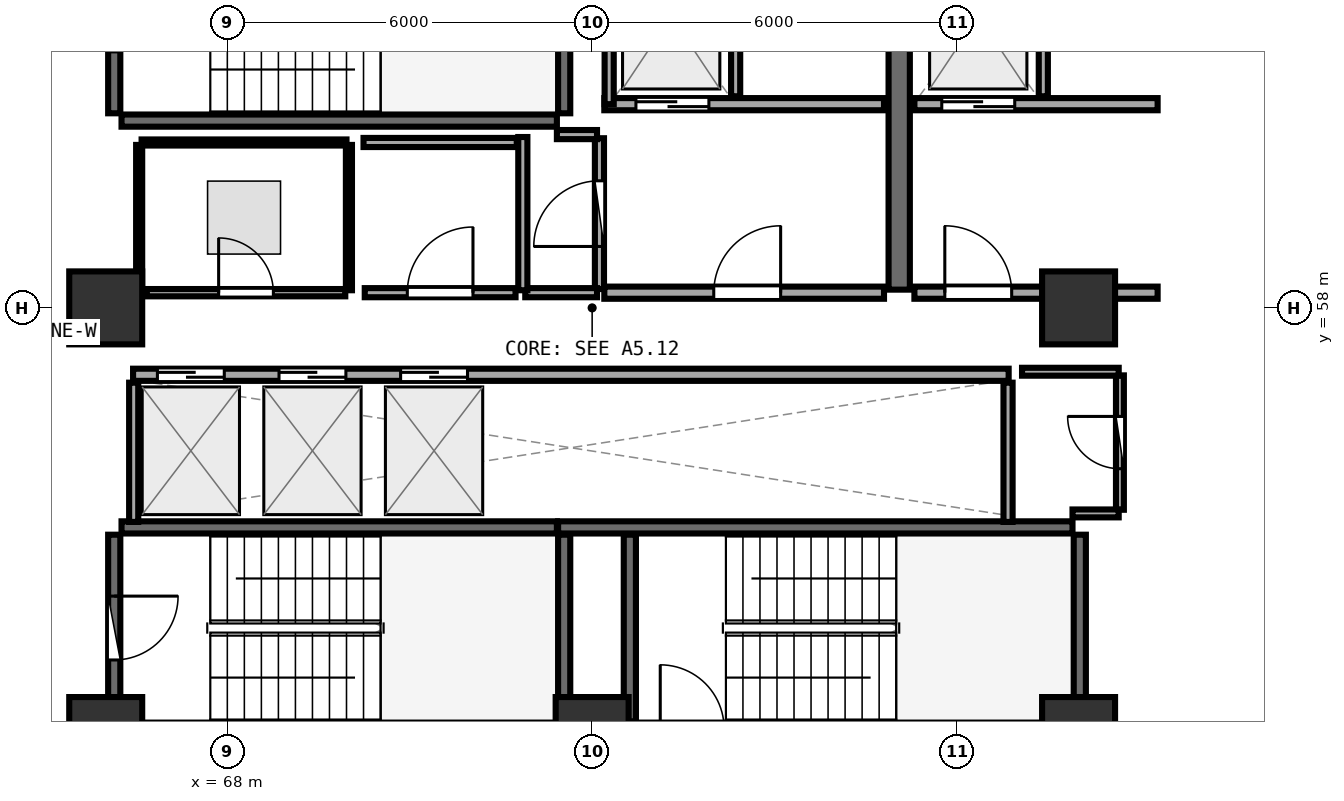
"""IFC4 building model, lengths in metres.
Left out: names, types, materials, properties, quantities, classifications, styles, units other than length and angle.
Written with IfcOpenShell. Run it as: python <this file> out.ifc"""

import sys

from ifc_helpers import new_model, si_unit, direction, frame, frame_2d, origin, origin_2d, place, context, subcontext, project, spatial, rectangle, extrude, element, fill, save


model = new_model("IFC4")
c1 = context("Model", 3, precision=1e-05, world=origin(), true_north=direction((0.0, 1.0)))
c2 = subcontext(c1, "Body", "Model", "MODEL_VIEW")
j1 = project(units=[si_unit("LENGTHUNIT", "METRE"), si_unit("PLANEANGLEUNIT", "RADIAN")], contexts=[c1])
p1 = place(None, origin())
s1 = spatial("IfcSite", under=j1, at=p1, CompositionType="ELEMENT")
p2 = place(p1, origin())
s2 = spatial("IfcBuilding", under=s1, at=p2, CompositionType="ELEMENT")
p3 = place(p2, frame((0.0, 0.0, 215.7)))
s3 = spatial("IfcBuildingStorey", under=s2, at=p3, CompositionType="ELEMENT", Elevation=215.7)
for number, where, z_axis, x_axis in (
    (1, (66.0, 51.0, 0.0), (0.0, 0.0, 1.0), (1.0, 0.0, 0.0)),
    (2, (74.0, 51.0, 0.0), (0.0, 0.0, 1.0), (1.0, 0.0, 0.0)),
    (3, (82.0, 51.0, 0.0), (0.0, 0.0, 1.0), (1.0, 0.0, 0.0)),
    (4, (82.0, 58.0, 0.0), (0.0, 0.0, 1.0), (1.0, 0.0, 0.0)),
    (5, (66.0, 58.0, 0.0), (0.0, 0.0, 1.0), (1.0, 0.0, 0.0)),
):
    element("IfcColumn", number, at=place(p3, frame(where, z_axis=z_axis, x_axis=x_axis)), inside=s3, PredefinedType="PILASTER", context=c2, shape_type="SweptSolid", body=[
        extrude(rectangle(XDim=1.2, YDim=1.2, at=origin_2d()), origin(), (0.0, 0.0, 1.0), 3.75),
    ])
p4 = place(p3, frame((66.26, 61.08, 0.0), z_axis=(0.0, 0.0, 1.0), x_axis=(1.0, 0.0, 0.0)))
e6 = element("IfcWall", 6, at=p4, inside=s3, PredefinedType="SHEAR", context=c2, shape_type="SweptSolid", body=[
    extrude(rectangle(XDim=7.16, YDim=0.2, at=frame_2d((3.58, 0.0))), origin(), (0.0, 0.0, 1.0), 3.49),
])
p5 = place(p3, frame((73.54, 61.2, 0.0), z_axis=(0.0, 0.0, 1.0), x_axis=(0.0, 1.0, 0.0)))
e7 = element("IfcWall", 7, at=p5, inside=s3, PredefinedType="SHEAR", context=c2, shape_type="SweptSolid", body=[
    extrude(rectangle(XDim=3.07, YDim=0.2, at=frame_2d((1.535, 0.0))), origin(), (0.0, 0.0, 1.0), 3.49),
])
p6 = place(p3, frame((66.14, 64.27, 0.0), z_axis=(0.0, 0.0, 1.0), x_axis=(0.0, -1.0, 0.0)))
e8 = element("IfcWall", 8, at=p6, inside=s3, PredefinedType="SHEAR", context=c2, shape_type="SweptSolid", body=[
    extrude(rectangle(XDim=3.07, YDim=0.2, at=frame_2d((1.535, 0.0))), origin(), (0.0, 0.0, 1.0), 3.49),
])
p7 = place(p6, frame((1.01, 0.0, 0.0)))
e9 = element("IfcOpeningElement", 9, at=p7, cuts=e8, PredefinedType="OPENING", context=c2, shape_type="SweptSolid", body=[
    extrude(rectangle(XDim=1.05, YDim=2.1, at=frame_2d((0.525, 1.05))), frame((0.0, 0.11, 0.0), z_axis=(0.0, -1.0, 0.0), x_axis=(1.0, 0.0, 0.0)), (0.0, 0.0, 1.0), 0.22),
])
p8 = place(p3, frame((82.02, 51.2, 0.0), z_axis=(0.0, 0.0, 1.0), x_axis=(0.0, 1.0, 0.0)))
e10 = element("IfcWall", 10, at=p8, inside=s3, PredefinedType="SHEAR", context=c2, shape_type="SweptSolid", body=[
    extrude(rectangle(XDim=3.07, YDim=0.2, at=frame_2d((1.535, 0.0))), origin(), (0.0, 0.0, 1.0), 3.49),
])
p9 = place(p3, frame((81.9, 54.39, 0.0), z_axis=(0.0, 0.0, 1.0), x_axis=(-1.0, 0.0, 0.0)))
e11 = element("IfcWall", 11, at=p9, inside=s3, PredefinedType="SHEAR", context=c2, shape_type="SweptSolid", body=[
    extrude(rectangle(XDim=8.46, YDim=0.2, at=frame_2d((4.23, 0.0))), origin(), (0.0, 0.0, 1.0), 3.49),
])
for number, where, z_axis, x_axis in (
    (12, (74.62, 54.27, 0.0), (0.0, 0.0, 1.0), (0.0, -1.0, 0.0)),
    (13, (73.54, 51.2, 0.0), (0.0, 0.0, 1.0), (0.0, 1.0, 0.0)),
):
    element("IfcWall", number, at=place(p3, frame(where, z_axis=z_axis, x_axis=x_axis)), inside=s3, PredefinedType="SHEAR", context=c2, shape_type="SweptSolid", body=[
        extrude(rectangle(XDim=3.07, YDim=0.2, at=frame_2d((1.535, 0.0))), origin(), (0.0, 0.0, 1.0), 3.49),
    ])
p10 = place(p3, frame((73.42, 54.39, 0.0), z_axis=(0.0, 0.0, 1.0), x_axis=(-1.0, 0.0, 0.0)))
e14 = element("IfcWall", 14, at=p10, inside=s3, PredefinedType="SHEAR", context=c2, shape_type="SweptSolid", body=[
    extrude(rectangle(XDim=7.16, YDim=0.2, at=frame_2d((3.58, 0.0))), origin(), (0.0, 0.0, 1.0), 3.49),
])
p11 = place(p3, frame((66.14, 54.27, 0.0), z_axis=(0.0, 0.0, 1.0), x_axis=(0.0, -1.0, 0.0)))
e15 = element("IfcWall", 15, at=p11, inside=s3, PredefinedType="SHEAR", context=c2, shape_type="SweptSolid", body=[
    extrude(rectangle(XDim=3.07, YDim=0.2, at=frame_2d((1.535, 0.0))), origin(), (0.0, 0.0, 1.0), 3.49),
])
p12 = place(p11, frame((1.01, 0.0, 0.0)))
e16 = element("IfcOpeningElement", 16, at=p12, cuts=e15, PredefinedType="OPENING", context=c2, shape_type="SweptSolid", body=[
    extrude(rectangle(XDim=1.05, YDim=2.1, at=frame_2d((0.525, 1.05))), frame((0.0, 0.11, 0.0), z_axis=(0.0, -1.0, 0.0), x_axis=(1.0, 0.0, 0.0)), (0.0, 0.0, 1.0), 0.22),
])
p13 = place(p3, frame((79.05, 58.3, 0.0), z_axis=(0.0, 0.0, 1.0), x_axis=(0.0, 1.0, 0.0)))
e17 = element("IfcWall", 17, at=p13, inside=s3, PredefinedType="SHEAR", context=c2, shape_type="SweptSolid", body=[
    extrude(rectangle(XDim=6.3, YDim=0.35, at=frame_2d((3.15, 0.0))), origin(), (0.0, 0.0, 1.0), 3.49),
])
p14 = place(p3, frame((74.2, 61.35, 0.0), z_axis=(0.0, 0.0, 1.0), x_axis=(1.0, 0.0, 0.0)))
e18 = element("IfcWall", 18, at=p14, inside=s3, PredefinedType="SOLIDWALL", context=c2, shape_type="SweptSolid", body=[
    extrude(rectangle(XDim=4.6, YDim=0.2, at=frame_2d((2.3, 0.0))), origin(), (0.0, 0.0, 1.0), 3.48),
])
p15 = place(p14, frame((0.52, 0.0, 0.0)))
e19 = element("IfcOpeningElement", 19, at=p15, cuts=e18, PredefinedType="OPENING", context=c2, shape_type="SweptSolid", body=[
    extrude(rectangle(XDim=1.2, YDim=2.15, at=frame_2d((0.6, 1.075))), frame((0.0, 0.11, 0.0), z_axis=(0.0, -1.0, 0.0), x_axis=(1.0, 0.0, 0.0)), (0.0, 0.0, 1.0), 0.22),
])
p16 = place(p3, frame((74.28, 61.35, 0.0), z_axis=(0.0, 0.0, 1.0), x_axis=(0.0, 1.0, 0.0)))
e20 = element("IfcWall", 20, at=p16, inside=s3, PredefinedType="PARTITIONING", context=c2, shape_type="SweptSolid", body=[
    extrude(rectangle(XDim=2.97, YDim=0.15, at=frame_2d((1.485, 0.0))), origin(), (0.0, 0.0, 1.0), 3.48),
])
p17 = place(p3, frame((76.36, 61.48, 0.0), z_axis=(0.0, 0.0, 1.0), x_axis=(0.0, 1.0, 0.0)))
e21 = element("IfcWall", 21, at=p17, inside=s3, PredefinedType="PARTITIONING", context=c2, shape_type="SweptSolid", body=[
    extrude(rectangle(XDim=2.84, YDim=0.15, at=frame_2d((1.42, 0.0))), origin(), (0.0, 0.0, 1.0), 3.48),
])
p18 = place(p3, frame((79.3, 61.35, 0.0), z_axis=(0.0, 0.0, 1.0), x_axis=(1.0, 0.0, 0.0)))
e22 = element("IfcWall", 22, at=p18, inside=s3, PredefinedType="SOLIDWALL", context=c2, shape_type="SweptSolid", body=[
    extrude(rectangle(XDim=4.0, YDim=0.2, at=frame_2d((2.0, 0.0))), origin(), (0.0, 0.0, 1.0), 2.775),
])
p19 = place(p18, frame((0.45, 0.0, 0.0)))
e23 = element("IfcOpeningElement", 23, at=p19, cuts=e22, PredefinedType="OPENING", context=c2, shape_type="SweptSolid", body=[
    extrude(rectangle(XDim=1.2, YDim=2.15, at=frame_2d((0.6, 1.075))), frame((0.0, 0.11, 0.0), z_axis=(0.0, -1.0, 0.0), x_axis=(1.0, 0.0, 0.0)), (0.0, 0.0, 1.0), 0.22),
])
p20 = place(p3, frame((81.42, 61.48, 0.0), z_axis=(0.0, 0.0, 1.0), x_axis=(0.0, 1.0, 0.0)))
e24 = element("IfcWall", 24, at=p20, inside=s3, PredefinedType="PARTITIONING", context=c2, shape_type="SweptSolid", body=[
    extrude(rectangle(XDim=2.84, YDim=0.15, at=frame_2d((1.42, 0.0))), origin(), (0.0, 0.0, 1.0), 3.48),
])
p21 = place(p3, frame((74.2, 58.25, 0.0), z_axis=(0.0, 0.0, 1.0), x_axis=(1.0, 0.0, 0.0)))
e25 = element("IfcWall", 25, at=p21, inside=s3, PredefinedType="SOLIDWALL", context=c2, shape_type="SweptSolid", body=[
    extrude(rectangle(XDim=4.6, YDim=0.2, at=frame_2d((2.3, 0.0))), origin(), (0.0, 0.0, 1.0), 3.48),
])
p22 = place(p21, frame((1.8, 0.0, 0.0)))
e26 = element("IfcOpeningElement", 26, at=p22, cuts=e25, PredefinedType="OPENING", context=c2, shape_type="SweptSolid", body=[
    extrude(rectangle(XDim=1.1, YDim=2.1, at=frame_2d((0.55, 1.05))), frame((0.0, 0.11, 0.0), z_axis=(0.0, -1.0, 0.0), x_axis=(1.0, 0.0, 0.0)), (0.0, 0.0, 1.0), 0.22),
])
p23 = place(p3, frame((79.3, 58.25, 0.0), z_axis=(0.0, 0.0, 1.0), x_axis=(1.0, 0.0, 0.0)))
e27 = element("IfcWall", 27, at=p23, inside=s3, PredefinedType="SOLIDWALL", context=c2, shape_type="SweptSolid", body=[
    extrude(rectangle(XDim=4.0, YDim=0.2, at=frame_2d((2.0, 0.0))), origin(), (0.0, 0.0, 1.0), 2.775),
])
p24 = place(p23, frame((0.5, 0.0, 0.0)))
e28 = element("IfcOpeningElement", 28, at=p24, cuts=e27, PredefinedType="OPENING", context=c2, shape_type="SweptSolid", body=[
    extrude(rectangle(XDim=1.1, YDim=2.1, at=frame_2d((0.55, 1.05))), frame((0.0, 0.11, 0.0), z_axis=(0.0, -1.0, 0.0), x_axis=(1.0, 0.0, 0.0)), (0.0, 0.0, 1.0), 0.22),
])
p25 = place(p3, frame((66.45, 56.9, 0.0), z_axis=(0.0, 0.0, 1.0), x_axis=(1.0, 0.0, 0.0)))
e29 = element("IfcWall", 29, at=p25, inside=s3, PredefinedType="SOLIDWALL", context=c2, shape_type="SweptSolid", body=[
    extrude(rectangle(XDim=14.4, YDim=0.2, at=frame_2d((7.2, 0.0))), origin(), (0.0, 0.0, 1.0), 3.48),
])
p26 = place(p25, frame((0.4, 0.0, 0.0)))
e30 = element("IfcOpeningElement", 30, at=p26, cuts=e29, PredefinedType="OPENING", context=c2, shape_type="SweptSolid", body=[
    extrude(rectangle(XDim=1.1, YDim=2.1, at=frame_2d((0.55, 1.05))), frame((0.0, 0.11, 0.0), z_axis=(0.0, -1.0, 0.0), x_axis=(1.0, 0.0, 0.0)), (0.0, 0.0, 1.0), 0.22),
])
p27 = place(p25, frame((2.4, 0.0, 0.0)))
e31 = element("IfcOpeningElement", 31, at=p27, cuts=e29, PredefinedType="OPENING", context=c2, shape_type="SweptSolid", body=[
    extrude(rectangle(XDim=1.1, YDim=2.1, at=frame_2d((0.55, 1.05))), frame((0.0, 0.11, 0.0), z_axis=(0.0, -1.0, 0.0), x_axis=(1.0, 0.0, 0.0)), (0.0, 0.0, 1.0), 0.22),
])
p28 = place(p25, frame((4.4, 0.0, 0.0)))
e32 = element("IfcOpeningElement", 32, at=p28, cuts=e29, PredefinedType="OPENING", context=c2, shape_type="SweptSolid", body=[
    extrude(rectangle(XDim=1.1, YDim=2.1, at=frame_2d((0.55, 1.05))), frame((0.0, 0.11, 0.0), z_axis=(0.0, -1.0, 0.0), x_axis=(1.0, 0.0, 0.0)), (0.0, 0.0, 1.0), 0.22),
])
for number, where, z_axis, x_axis in (
    (33, (66.46, 54.48, 0.0), (0.0, 0.0, 1.0), (0.0, 1.0, 0.0)),
    (34, (80.84, 54.48, 0.0), (0.0, 0.0, 1.0), (0.0, 1.0, 0.0)),
):
    element("IfcWall", number, at=place(p3, frame(where, z_axis=z_axis, x_axis=x_axis)), inside=s3, PredefinedType="PARTITIONING", context=c2, shape_type="SweptSolid", body=[
        extrude(rectangle(XDim=2.29, YDim=0.15, at=frame_2d((1.145, 0.0))), origin(), (0.0, 0.0, 1.0), 3.48),
    ])
p29 = place(p3, frame((74.12, 58.31, 0.0), z_axis=(0.0, 0.0, 1.0), x_axis=(0.0, 1.0, 0.0)))
e35 = element("IfcWall", 35, at=p29, inside=s3, PredefinedType="PARTITIONING", context=c2, shape_type="SweptSolid", body=[
    extrude(rectangle(XDim=2.48, YDim=0.15, at=frame_2d((1.24, 0.0))), origin(), (0.0, 0.0, 1.0), 3.48),
])
p30 = place(p29, frame((0.7, 0.0, 0.0)))
e36 = element("IfcOpeningElement", 36, at=p30, cuts=e35, PredefinedType="OPENING", context=c2, shape_type="SweptSolid", body=[
    extrude(rectangle(XDim=1.08, YDim=2.1, at=frame_2d((0.54, 1.05))), frame((0.0, 0.085, 0.0), z_axis=(0.0, -1.0, 0.0), x_axis=(1.0, 0.0, 0.0)), (0.0, 0.0, 1.0), 0.17),
])
p31 = place(p3, frame((82.68, 54.68, 0.0), z_axis=(0.0, 0.0, 1.0), x_axis=(0.0, 1.0, 0.0)))
e37 = element("IfcWall", 37, at=p31, inside=s3, PredefinedType="PLUMBINGWALL", context=c2, shape_type="SweptSolid", body=[
    extrude(rectangle(XDim=2.21, YDim=0.13, at=frame_2d((1.105, 0.0))), origin(), (0.0, 0.0, 1.0), 3.48),
])
p32 = place(p31, frame((0.675, 0.0, 0.0)))
e38 = element("IfcOpeningElement", 38, at=p32, cuts=e37, PredefinedType="OPENING", context=c2, shape_type="SweptSolid", body=[
    extrude(rectangle(XDim=0.86, YDim=2.05, at=frame_2d((0.43, 1.025))), frame((0.0, 0.075, 0.0), z_axis=(0.0, -1.0, 0.0), x_axis=(1.0, 0.0, 0.0)), (0.0, 0.0, 1.0), 0.15),
])
p33 = place(p3, frame((66.675, 58.25, 0.0), z_axis=(0.0, 0.0, 1.0), x_axis=(1.0, 0.0, 0.0)))
e39 = element("IfcWall", 39, at=p33, inside=s3, PredefinedType="PARTITIONING", context=c2, shape_type="SweptSolid", body=[
    extrude(rectangle(XDim=3.265, YDim=0.12, at=frame_2d((1.632, 0.0))), origin(), (0.0, 0.0, 1.0), 3.48),
])
p34 = place(p33, frame((1.182, 0.0, 0.0)))
e40 = element("IfcOpeningElement", 40, at=p34, cuts=e39, PredefinedType="OPENING", context=c2, shape_type="SweptSolid", body=[
    extrude(rectangle(XDim=0.9, YDim=2.08, at=frame_2d((0.45, 1.04))), frame((0.0, 0.07, 0.0), z_axis=(0.0, -1.0, 0.0), x_axis=(1.0, 0.0, 0.0)), (0.0, 0.0, 1.0), 0.14),
])
p35 = place(p3, frame((70.26, 58.25, 0.0), z_axis=(0.0, 0.0, 1.0), x_axis=(1.0, 0.0, 0.0)))
e41 = element("IfcWall", 41, at=p35, inside=s3, PredefinedType="PARTITIONING", context=c2, shape_type="SweptSolid", body=[
    extrude(rectangle(XDim=2.48, YDim=0.15, at=frame_2d((1.24, 0.0))), origin(), (0.0, 0.0, 1.0), 3.48),
])
p36 = place(p35, frame((0.7, 0.0, 0.0)))
e42 = element("IfcOpeningElement", 42, at=p36, cuts=e41, PredefinedType="OPENING", context=c2, shape_type="SweptSolid", body=[
    extrude(rectangle(XDim=1.08, YDim=2.1, at=frame_2d((0.54, 1.05))), frame((0.0, 0.085, 0.0), z_axis=(0.0, -1.0, 0.0), x_axis=(1.0, 0.0, 0.0)), (0.0, 0.0, 1.0), 0.17),
])
p37 = place(p3, frame((72.9, 58.25, 0.0), z_axis=(0.0, 0.0, 1.0), x_axis=(1.0, 0.0, 0.0)))
e43 = element("IfcWall", 43, at=p37, inside=s3, PredefinedType="PARTITIONING", context=c2, shape_type="SweptSolid", body=[
    extrude(rectangle(XDim=1.18, YDim=0.15, at=frame_2d((0.59, 0.0))), origin(), (0.0, 0.0, 1.0), 3.48),
])
p38 = place(p3, frame((74.08, 60.85, 0.0), z_axis=(0.0, 0.0, 1.0), x_axis=(-1.0, 0.0, 0.0)))
e44 = element("IfcWall", 44, at=p38, inside=s3, PredefinedType="PARTITIONING", context=c2, shape_type="SweptSolid", body=[
    extrude(rectangle(XDim=0.66, YDim=0.15, at=frame_2d((0.33, 0.0))), origin(), (0.0, 0.0, 1.0), 3.48),
])
p39 = place(p3, frame((72.86, 60.81, 0.0), z_axis=(0.0, 0.0, 1.0), x_axis=(0.0, -1.0, 0.0)))
e45 = element("IfcWall", 45, at=p39, inside=s3, PredefinedType="PARTITIONING", context=c2, shape_type="SweptSolid", body=[
    extrude(rectangle(XDim=2.52, YDim=0.15, at=frame_2d((1.26, 0.0))), origin(), (0.0, 0.0, 1.0), 3.48),
])
p40 = place(p3, frame((81.9, 54.62, 0.0), z_axis=(0.0, 0.0, 1.0), x_axis=(1.0, 0.0, 0.0)))
e46 = element("IfcWall", 46, at=p40, inside=s3, PredefinedType="PLUMBINGWALL", context=c2, shape_type="SweptSolid", body=[
    extrude(rectangle(XDim=0.76, YDim=0.13, at=frame_2d((0.38, 0.0))), origin(), (0.0, 0.0, 1.0), 2.775),
])
p41 = place(p3, frame((82.66, 56.95, 0.0), z_axis=(0.0, 0.0, 1.0), x_axis=(-1.0, 0.0, 0.0)))
e47 = element("IfcWall", 47, at=p41, inside=s3, PredefinedType="PLUMBINGWALL", context=c2, shape_type="SweptSolid", body=[
    extrude(rectangle(XDim=1.59, YDim=0.13, at=frame_2d((0.795, 0.0))), origin(), (0.0, 0.0, 1.0), 2.775),
])
p42 = place(p3, frame((70.0, 58.29, 0.0), z_axis=(0.0, 0.0, 1.0), x_axis=(0.0, 1.0, 0.0)))
e48 = element("IfcWall", 48, at=p42, inside=s3, PredefinedType="PARTITIONING", context=c2, shape_type="SweptSolid", body=[
    extrude(rectangle(XDim=2.39, YDim=0.1, at=frame_2d((1.195, 0.0))), origin(), (0.0, 0.0, 1.0), 3.48),
])
p43 = place(p3, frame((69.96, 60.72, 0.0), z_axis=(0.0, 0.0, 1.0), x_axis=(-1.0, 0.0, 0.0)))
e49 = element("IfcWall", 49, at=p43, inside=s3, PredefinedType="PARTITIONING", context=c2, shape_type="SweptSolid", body=[
    extrude(rectangle(XDim=3.37, YDim=0.1, at=frame_2d((1.685, 0.0))), origin(), (0.0, 0.0, 1.0), 3.48),
])
p44 = place(p3, frame((66.55, 60.68, 0.0), z_axis=(0.0, 0.0, 1.0), x_axis=(0.0, -1.0, 0.0)))
e50 = element("IfcWall", 50, at=p44, inside=s3, PredefinedType="PARTITIONING", context=c2, shape_type="SweptSolid", body=[
    extrude(rectangle(XDim=2.383, YDim=0.1, at=frame_2d((1.191, 0.0))), origin(), (0.0, 0.0, 1.0), 3.48),
])
p45 = place(p3, frame((72.76, 60.72, 0.0), z_axis=(0.0, 0.0, 1.0), x_axis=(-1.0, 0.0, 0.0)))
e51 = element("IfcWall", 51, at=p45, inside=s3, PredefinedType="PARTITIONING", context=c2, shape_type="SweptSolid", body=[
    extrude(rectangle(XDim=2.52, YDim=0.15, at=frame_2d((1.26, 0.0))), origin(), (0.0, 0.0, 1.0), 3.48),
])
p46 = place(p3, frame((82.588, 48.389, 0.0), z_axis=(0.0, 0.0, 1.0), x_axis=(0.68157475052, 0.731748494671, 0.0)))
e52 = element("IfcWall", 52, at=p46, inside=s3, PredefinedType="PARTITIONING", context=c2, shape_type="SweptSolid", body=[
    extrude(rectangle(XDim=5.08, YDim=0.1, at=frame_2d((2.54, 0.0))), origin(), (0.0, 0.0, 1.0), 3.025),
])
p47 = place(p3, frame((87.468, 60.334, 0.0), z_axis=(0.0, 0.0, 1.0), x_axis=(-0.534944175276, 0.844887406308, 0.0)))
e53 = element("IfcWall", 53, at=p47, inside=s3, PredefinedType="PARTITIONING", context=c2, shape_type="SweptSolid", body=[
    extrude(rectangle(XDim=8.128, YDim=0.1, at=frame_2d((4.064, 0.0))), origin(), (0.0, 0.0, 1.0), 3.025),
])
p48 = place(p12, origin())
e54 = element("IfcDoor", 54, at=p48, inside=s3, OperationType="SINGLE_SWING_LEFT", PredefinedType="DOOR", context=c2, shape_type="SweptSolid", body=[
    extrude(rectangle(XDim=1.05, YDim=2.1, at=frame_2d((0.525, 1.05))), frame((0.0, 0.025, 0.0), z_axis=(0.0, -1.0, 0.0), x_axis=(1.0, 0.0, 0.0)), (0.0, 0.0, 1.0), 0.05),
])
fill(e16, e54)
p49 = place(p15, origin())
e55 = element("IfcDoor", 55, at=p49, inside=s3, OperationType="DOUBLE_DOOR_SLIDING", PredefinedType="DOOR", context=c2, shape_type="SweptSolid", body=[
    extrude(rectangle(XDim=1.2, YDim=2.15, at=frame_2d((0.6, 1.075))), frame((0.0, 0.025, 0.0), z_axis=(0.0, -1.0, 0.0), x_axis=(1.0, 0.0, 0.0)), (0.0, 0.0, 1.0), 0.05),
])
fill(e19, e55)
p50 = place(p19, origin())
e56 = element("IfcDoor", 56, at=p50, inside=s3, OperationType="DOUBLE_DOOR_SLIDING", PredefinedType="DOOR", context=c2, shape_type="SweptSolid", body=[
    extrude(rectangle(XDim=1.2, YDim=2.15, at=frame_2d((0.6, 1.075))), frame((0.0, 0.025, 0.0), z_axis=(0.0, -1.0, 0.0), x_axis=(1.0, 0.0, 0.0)), (0.0, 0.0, 1.0), 0.05),
])
fill(e23, e56)
p51 = place(p22, frame((1.1, 0.0, 0.0), z_axis=(0.0, 0.0, 1.0), x_axis=(-1.0, 0.0, 0.0)))
e57 = element("IfcDoor", 57, at=p51, inside=s3, OperationType="SINGLE_SWING_LEFT", PredefinedType="DOOR", context=c2, shape_type="SweptSolid", body=[
    extrude(rectangle(XDim=1.1, YDim=2.1, at=frame_2d((0.55, 1.05))), frame((0.0, 0.025, 0.0), z_axis=(0.0, -1.0, 0.0), x_axis=(1.0, 0.0, 0.0)), (0.0, 0.0, 1.0), 0.05),
])
fill(e26, e57)
p52 = place(p24, frame((1.1, 0.0, 0.0), z_axis=(0.0, 0.0, 1.0), x_axis=(-1.0, 0.0, 0.0)))
e58 = element("IfcDoor", 58, at=p52, inside=s3, OperationType="SINGLE_SWING_RIGHT", PredefinedType="DOOR", context=c2, shape_type="SweptSolid", body=[
    extrude(rectangle(XDim=1.1, YDim=2.1, at=frame_2d((0.55, 1.05))), frame((0.0, 0.025, 0.0), z_axis=(0.0, -1.0, 0.0), x_axis=(1.0, 0.0, 0.0)), (0.0, 0.0, 1.0), 0.05),
])
fill(e28, e58)
p53 = place(p26, origin())
e59 = element("IfcDoor", 59, at=p53, inside=s3, OperationType="DOUBLE_DOOR_SLIDING", PredefinedType="DOOR", context=c2, shape_type="SweptSolid", body=[
    extrude(rectangle(XDim=1.1, YDim=2.1, at=frame_2d((0.55, 1.05))), frame((0.0, 0.025, 0.0), z_axis=(0.0, -1.0, 0.0), x_axis=(1.0, 0.0, 0.0)), (0.0, 0.0, 1.0), 0.05),
])
fill(e30, e59)
p54 = place(p27, origin())
e60 = element("IfcDoor", 60, at=p54, inside=s3, OperationType="DOUBLE_DOOR_SLIDING", PredefinedType="DOOR", context=c2, shape_type="SweptSolid", body=[
    extrude(rectangle(XDim=1.1, YDim=2.1, at=frame_2d((0.55, 1.05))), frame((0.0, 0.025, 0.0), z_axis=(0.0, -1.0, 0.0), x_axis=(1.0, 0.0, 0.0)), (0.0, 0.0, 1.0), 0.05),
])
fill(e31, e60)
p55 = place(p28, origin())
e61 = element("IfcDoor", 61, at=p55, inside=s3, OperationType="DOUBLE_DOOR_SLIDING", PredefinedType="DOOR", context=c2, shape_type="SweptSolid", body=[
    extrude(rectangle(XDim=1.1, YDim=2.1, at=frame_2d((0.55, 1.05))), frame((0.0, 0.025, 0.0), z_axis=(0.0, -1.0, 0.0), x_axis=(1.0, 0.0, 0.0)), (0.0, 0.0, 1.0), 0.05),
])
fill(e32, e61)
p56 = place(p30, origin())
e62 = element("IfcDoor", 62, at=p56, inside=s3, OperationType="SINGLE_SWING_LEFT", PredefinedType="DOOR", context=c2, shape_type="SweptSolid", body=[
    extrude(rectangle(XDim=1.08, YDim=2.1, at=frame_2d((0.54, 1.05))), frame((0.0, 0.025, 0.0), z_axis=(0.0, -1.0, 0.0), x_axis=(1.0, 0.0, 0.0)), (0.0, 0.0, 1.0), 0.05),
])
fill(e36, e62)
p57 = place(p32, origin())
e63 = element("IfcDoor", 63, at=p57, inside=s3, OperationType="SINGLE_SWING_RIGHT", PredefinedType="DOOR", context=c2, shape_type="SweptSolid", body=[
    extrude(rectangle(XDim=0.86, YDim=2.05, at=frame_2d((0.43, 1.025))), frame((0.0, 0.025, 0.0), z_axis=(0.0, -1.0, 0.0), x_axis=(1.0, 0.0, 0.0)), (0.0, 0.0, 1.0), 0.05),
])
fill(e38, e63)
p58 = place(p34, origin())
e64 = element("IfcDoor", 64, at=p58, inside=s3, OperationType="SINGLE_SWING_LEFT", PredefinedType="DOOR", context=c2, shape_type="SweptSolid", body=[
    extrude(rectangle(XDim=0.9, YDim=2.08, at=frame_2d((0.45, 1.04))), frame((0.0, 0.025, 0.0), z_axis=(0.0, -1.0, 0.0), x_axis=(1.0, 0.0, 0.0)), (0.0, 0.0, 1.0), 0.05),
])
fill(e40, e64)
p59 = place(p36, origin())
e65 = element("IfcDoor", 65, at=p59, inside=s3, OperationType="SINGLE_SWING_RIGHT", PredefinedType="DOOR", context=c2, shape_type="SweptSolid", body=[
    extrude(rectangle(XDim=1.08, YDim=2.1, at=frame_2d((0.54, 1.05))), frame((0.0, 0.025, 0.0), z_axis=(0.0, -1.0, 0.0), x_axis=(1.0, 0.0, 0.0)), (0.0, 0.0, 1.0), 0.05),
])
fill(e42, e65)
save(model, sys.argv[1])
